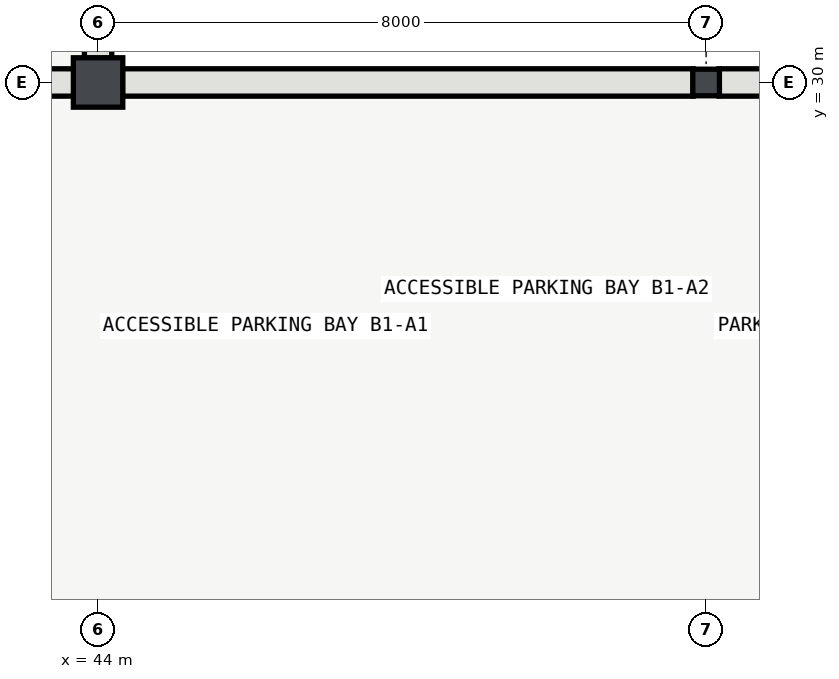
"""IFC4 building model, lengths in metres.
Left out: names, types, materials, properties, quantities, classifications, styles, units other than length and angle.
Written with IfcOpenShell. Run it as: python <this file> out.ifc"""

import sys

from ifc_helpers import new_model, si_unit, direction, frame, frame_2d, origin, origin_2d, place, context, subcontext, project, spatial, rectangle, hollow_rectangle, i_section, extrude, element, save


model = new_model("IFC4")
c1 = context("Model", 3, precision=1e-05, world=origin(), true_north=direction((0.0, 1.0)))
c2 = subcontext(c1, "Body", "Model", "MODEL_VIEW")
j1 = project(units=[si_unit("LENGTHUNIT", "METRE"), si_unit("PLANEANGLEUNIT", "RADIAN")], contexts=[c1])
p1 = place(None, origin())
s1 = spatial("IfcSite", under=j1, at=p1, CompositionType="ELEMENT")
p2 = place(p1, origin())
s2 = spatial("IfcBuilding", under=s1, at=p2, CompositionType="ELEMENT")
p3 = place(p2, frame((0.0, 0.0, -4.8)))
s3 = spatial("IfcBuildingStorey", under=s2, at=p3, CompositionType="ELEMENT", Elevation=-4.8)
p4 = place(p3, frame((44.0, 30.0, 0.0), z_axis=(0.0, 0.0, 1.0), x_axis=(1.0, 0.0, 0.0)))
e1 = element("IfcColumn", 1, at=p4, inside=s3, PredefinedType="COLUMN", context=c2, shape_type="SweptSolid", body=[
    extrude(hollow_rectangle(XDim=0.65, YDim=0.65, WallThickness=0.026, InnerFilletRadius=0.026, OuterFilletRadius=0.052, at=origin_2d()), origin(), (0.0, 0.0, 1.0), 4.8),
])
p5 = place(p3, frame((52.0, 30.0, 0.0), z_axis=(0.0, 0.0, 1.0), x_axis=(1.0, 0.0, 0.0)))
e2 = element("IfcColumn", 2, at=p5, inside=s3, PredefinedType="COLUMN", context=c2, shape_type="SweptSolid", body=[
    extrude(i_section(OverallWidth=0.35, OverallDepth=0.35, WebThickness=0.012, FlangeThickness=0.019, FilletRadius=0.02, at=origin_2d()), origin(), (0.0, 0.0, 1.0), 4.8),
])
p6 = place(p3, frame((43.679, 30.0, 0.0), z_axis=(0.0, 0.0, 1.0), x_axis=(-1.0, 0.0, 0.0)))
e3 = element("IfcWall", 3, at=p6, inside=s3, PredefinedType="USERDEFINED", context=c2, shape_type="SweptSolid", body=[
    extrude(rectangle(XDim=8.158, YDim=0.36, at=frame_2d((4.079, 0.0))), origin(), (0.0, 0.0, 1.0), 3.995),
])
p7 = place(p3, frame((51.829, 30.0, 0.0), z_axis=(0.0, 0.0, 1.0), x_axis=(-1.0, 0.0, 0.0)))
e4 = element("IfcWall", 4, at=p7, inside=s3, PredefinedType="USERDEFINED", context=c2, shape_type="SweptSolid", body=[
    extrude(rectangle(XDim=7.508, YDim=0.36, at=frame_2d((3.754, 0.0))), origin(), (0.0, 0.0, 1.0), 4.043),
])
p8 = place(p3, frame((59.829, 30.0, 0.0), z_axis=(0.0, 0.0, 1.0), x_axis=(-1.0, 0.0, 0.0)))
e5 = element("IfcWall", 5, at=p8, inside=s3, PredefinedType="USERDEFINED", context=c2, shape_type="SweptSolid", body=[
    extrude(rectangle(XDim=7.658, YDim=0.36, at=frame_2d((3.829, 0.0))), origin(), (0.0, 0.0, 1.0), 4.043),
])
p9 = place(p3, frame((44.0, 30.321, 0.0), z_axis=(0.0, 0.0, 1.0), x_axis=(0.0, 1.0, 0.0)))
e6 = element("IfcWall", 6, at=p9, inside=s3, PredefinedType="USERDEFINED", context=c2, shape_type="SweptSolid", body=[
    extrude(rectangle(XDim=7.358, YDim=0.36, at=frame_2d((3.679, 0.0))), origin(), (0.0, 0.0, 1.0), 3.883),
])
save(model, sys.argv[1])
